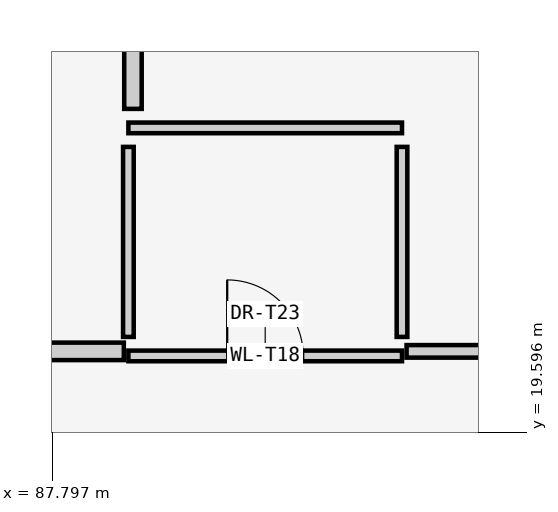
"""IFC4 building model, lengths in metres.
Left out: names, types, materials, properties, quantities, classifications, styles, units other than length and angle.
Written with IfcOpenShell. Run it as: python <this file> out.ifc"""

import sys

from ifc_helpers import new_model, si_unit, direction, frame, frame_2d, origin, place, context, subcontext, project, spatial, rectangle, extrude, element, fill, save


model = new_model("IFC4")
c1 = context("Model", 3, precision=1e-05, world=origin(), true_north=direction((0.0, 1.0)))
c2 = subcontext(c1, "Body", "Model", "MODEL_VIEW")
j1 = project(units=[si_unit("LENGTHUNIT", "METRE"), si_unit("PLANEANGLEUNIT", "RADIAN")], contexts=[c1])
p1 = place(None, origin())
s1 = spatial("IfcSite", under=j1, at=p1, CompositionType="ELEMENT")
p2 = place(p1, origin())
s2 = spatial("IfcBuilding", under=s1, at=p2, CompositionType="ELEMENT")
p3 = place(p2, frame((0.0, 0.0, -4.8)))
s3 = spatial("IfcBuildingStorey", under=s2, at=p3, CompositionType="ELEMENT", Elevation=-4.8)
p4 = place(p3, frame((88.8, 20.6, 0.0), z_axis=(0.0, 0.0, 1.0), x_axis=(1.0, 0.0, 0.0)))
e1 = element("IfcWall", 1, at=p4, inside=s3, PredefinedType="PARTITIONING", context=c2, shape_type="SweptSolid", body=[
    extrude(rectangle(XDim=3.6, YDim=0.14, at=frame_2d((1.8, 0.0))), origin(), (0.0, 0.0, 1.0), 4.32),
])
p5 = place(p4, frame((1.3, 0.0, 0.0)))
e2 = element("IfcOpeningElement", 2, at=p5, cuts=e1, PredefinedType="OPENING", context=c2, shape_type="SweptSolid", body=[
    extrude(rectangle(XDim=1.0, YDim=2.15, at=frame_2d((0.5, 1.075))), frame((0.0, 0.08, 0.0), z_axis=(0.0, -1.0, 0.0), x_axis=(1.0, 0.0, 0.0)), (0.0, 0.0, 1.0), 0.16),
])
p6 = place(p3, frame((88.8, 23.6, 0.0), z_axis=(0.0, 0.0, 1.0), x_axis=(1.0, 0.0, 0.0)))
e3 = element("IfcWall", 3, at=p6, inside=s3, PredefinedType="PARTITIONING", context=c2, shape_type="SweptSolid", body=[
    extrude(rectangle(XDim=3.6, YDim=0.14, at=frame_2d((1.8, 0.0))), origin(), (0.0, 0.0, 1.0), 4.32),
])
for number, where, z_axis, x_axis in (
    (4, (88.8, 20.85, 0.0), (0.0, 0.0, 1.0), (0.0, 1.0, 0.0)),
    (5, (92.4, 20.85, 0.0), (0.0, 0.0, 1.0), (0.0, 1.0, 0.0)),
):
    element("IfcWall", number, at=place(p3, frame(where, z_axis=z_axis, x_axis=x_axis)), inside=s3, PredefinedType="PARTITIONING", context=c2, shape_type="SweptSolid", body=[
        extrude(rectangle(XDim=2.5, YDim=0.14, at=frame_2d((1.25, 0.0))), origin(), (0.0, 0.0, 1.0), 4.32),
    ])
p7 = place(p3, frame((61.4, 20.66, 0.0), z_axis=(0.0, 0.0, 1.0), x_axis=(1.0, 0.0, 0.0)))
e6 = element("IfcWall", 6, at=p7, inside=s3, PredefinedType="SOLIDWALL", context=c2, shape_type="SweptSolid", body=[
    extrude(rectangle(XDim=27.34, YDim=0.23, at=frame_2d((13.67, 0.0))), origin(), (0.0, 0.0, 1.0), 4.33),
])
p8 = place(p7, frame((12.77, 0.0, 0.0)))
e7 = element("IfcOpeningElement", 7, at=p8, cuts=e6, PredefinedType="OPENING", context=c2, shape_type="SweptSolid", body=[
    extrude(rectangle(XDim=1.8, YDim=2.4, at=frame_2d((0.9, 1.2))), frame((0.0, 0.125, 0.0), z_axis=(0.0, -1.0, 0.0), x_axis=(1.0, 0.0, 0.0)), (0.0, 0.0, 1.0), 0.25),
])
p9 = place(p3, frame((92.46, 20.66, 0.0), z_axis=(0.0, 0.0, 1.0), x_axis=(1.0, 0.0, 0.0)))
e8 = element("IfcWall", 8, at=p9, inside=s3, PredefinedType="PARTITIONING", context=c2, shape_type="SweptSolid", body=[
    extrude(rectangle(XDim=3.54, YDim=0.165, at=frame_2d((1.77, 0.0))), origin(), (0.0, 0.0, 1.0), 4.33),
])
p10 = place(p3, frame((88.86, 23.85, 0.0), z_axis=(0.0, 0.0, 1.0), x_axis=(0.0, 1.0, 0.0)))
e9 = element("IfcWall", 9, at=p10, inside=s3, PredefinedType="SOLIDWALL", context=c2, shape_type="SweptSolid", body=[
    extrude(rectangle(XDim=17.84, YDim=0.23, at=frame_2d((8.92, 0.0))), origin(), (0.0, 0.0, 1.0), 4.33),
])
p11 = place(p5, origin())
e10 = element("IfcDoor", 10, at=p11, inside=s3, OperationType="SINGLE_SWING_LEFT", PredefinedType="DOOR", context=c2, shape_type="SweptSolid", body=[
    extrude(rectangle(XDim=1.0, YDim=2.15, at=frame_2d((0.5, 1.075))), frame((0.0, 0.025, 0.0), z_axis=(0.0, -1.0, 0.0), x_axis=(1.0, 0.0, 0.0)), (0.0, 0.0, 1.0), 0.05),
])
fill(e2, e10)
save(model, sys.argv[1])
